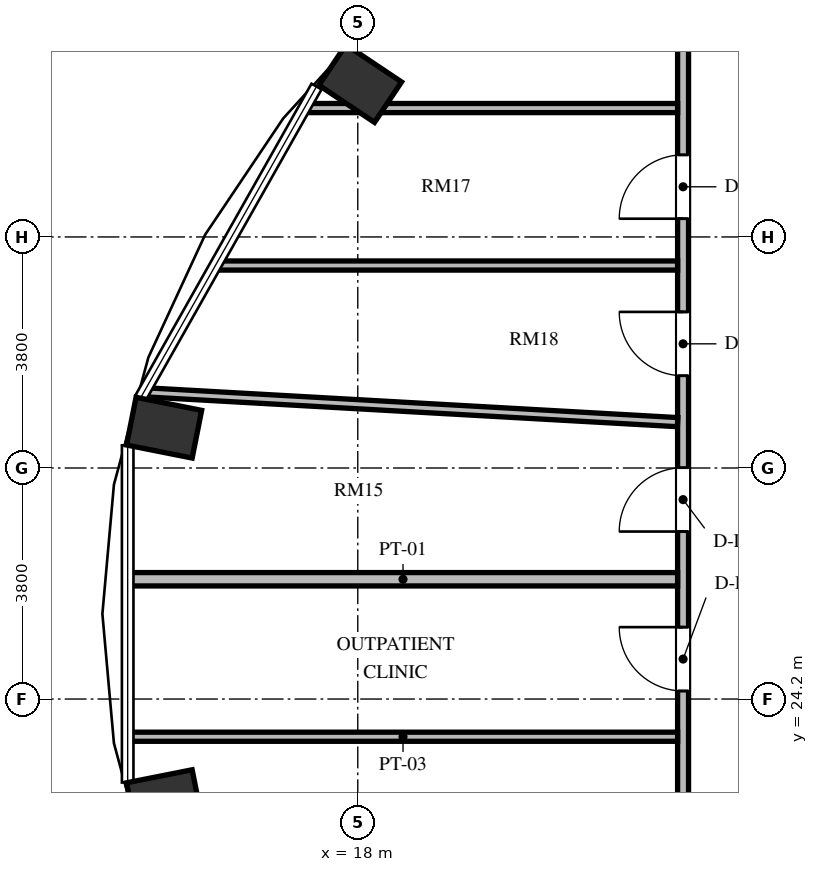
"""IFC4 building model, lengths in metres.
Left out: names, types, materials, properties, quantities, classifications, styles, units other than length and angle.
Written with IfcOpenShell. Run it as: python <this file> out.ifc"""

import sys

from ifc_helpers import new_model, si_unit, direction, frame, frame_2d, origin, origin_2d, place, context, subcontext, project, spatial, rectangle, extrude, element, fill, save


model = new_model("IFC4")
c1 = context("Model", 3, precision=1e-05, world=origin(), true_north=direction((0.0, 1.0)))
c2 = subcontext(c1, "Body", "Model", "MODEL_VIEW")
j1 = project(units=[si_unit("LENGTHUNIT", "METRE"), si_unit("PLANEANGLEUNIT", "RADIAN")], contexts=[c1])
p1 = place(None, origin())
s1 = spatial("IfcSite", under=j1, at=p1, CompositionType="ELEMENT")
p2 = place(p1, origin())
s2 = spatial("IfcBuilding", under=s1, at=p2, CompositionType="ELEMENT")
p3 = place(p2, frame((0.0, 0.0, 213.072)))
s3 = spatial("IfcBuildingStorey", under=s2, at=p3, CompositionType="ELEMENT", Elevation=213.072)
for number, where, z_axis, x_axis in (
    (1, (18.04, 34.323, 0.0), (0.0, 0.0, 1.0), (-0.831, 0.556, 0.0)),
    (2, (14.815, 28.663, 0.0), (0.0, 0.0, 1.0), (-0.981, 0.195, 0.0)),
    (3, (14.815, 22.537, 0.0), (0.0, 0.0, 1.0), (-0.981, -0.195, 0.0)),
):
    element("IfcColumn", number, at=place(p3, frame(where, z_axis=z_axis, x_axis=x_axis)), inside=s3, PredefinedType="COLUMN", context=c2, shape_type="SweptSolid", body=[
        extrude(rectangle(XDim=1.1, YDim=0.8, at=origin_2d()), origin(), (0.0, 0.0, 1.0), 3.648),
    ])
p4 = place(p3, frame((23.35, 19.98, 0.0), z_axis=(0.0, 0.0, 1.0), x_axis=(0.0, 1.0, 0.0)))
e4 = element("IfcWall", 4, at=p4, inside=s3, PredefinedType="PARTITIONING", context=c2, shape_type="SweptSolid", body=[
    extrude(rectangle(XDim=16.042, YDim=0.18, at=frame_2d((8.021, 0.0))), origin(), (0.0, 0.0, 1.0), 3.448),
])
p5 = place(p4, frame((6.975, 0.0, 0.0)))
e5 = element("IfcOpeningElement", 5, at=p5, cuts=e4, PredefinedType="OPENING", context=c2, shape_type="SweptSolid", body=[
    extrude(rectangle(XDim=1.05, YDim=2.15, at=frame_2d((0.525, 1.075))), frame((0.0, 0.1, 0.0), z_axis=(0.0, -1.0, 0.0), x_axis=(1.0, 0.0, 0.0)), (0.0, 0.0, 1.0), 0.2),
])
p6 = place(p4, frame((4.353, 0.0, 0.0)))
e6 = element("IfcOpeningElement", 6, at=p6, cuts=e4, PredefinedType="OPENING", context=c2, shape_type="SweptSolid", body=[
    extrude(rectangle(XDim=1.05, YDim=2.15, at=frame_2d((0.525, 1.075))), frame((0.0, 0.1, 0.0), z_axis=(0.0, -1.0, 0.0), x_axis=(1.0, 0.0, 0.0)), (0.0, 0.0, 1.0), 0.2),
])
p7 = place(p4, frame((12.12, 0.0, 0.0)))
e7 = element("IfcOpeningElement", 7, at=p7, cuts=e4, PredefinedType="OPENING", context=c2, shape_type="SweptSolid", body=[
    extrude(rectangle(XDim=1.05, YDim=2.15, at=frame_2d((0.525, 1.075))), frame((0.0, 0.1, 0.0), z_axis=(0.0, -1.0, 0.0), x_axis=(1.0, 0.0, 0.0)), (0.0, 0.0, 1.0), 0.2),
])
p8 = place(p4, frame((9.537, 0.0, 0.0)))
e8 = element("IfcOpeningElement", 8, at=p8, cuts=e4, PredefinedType="OPENING", context=c2, shape_type="SweptSolid", body=[
    extrude(rectangle(XDim=1.05, YDim=2.15, at=frame_2d((0.525, 1.075))), frame((0.0, 0.1, 0.0), z_axis=(0.0, -1.0, 0.0), x_axis=(1.0, 0.0, 0.0)), (0.0, 0.0, 1.0), 0.2),
])
p9 = place(p3, frame((14.228, 23.58, 0.0), z_axis=(0.0, 0.0, 1.0), x_axis=(1.0, 0.0, 0.0)))
e9 = element("IfcWall", 9, at=p9, inside=s3, PredefinedType="PARTITIONING", context=c2, shape_type="SweptSolid", body=[
    extrude(rectangle(XDim=9.032, YDim=0.15, at=frame_2d((4.516, 0.0))), origin(), (0.0, 0.0, 1.0), 3.448),
])
p10 = place(p3, frame((14.228, 26.17, 0.0), z_axis=(0.0, 0.0, 1.0), x_axis=(1.0, 0.0, 0.0)))
e10 = element("IfcWall", 10, at=p10, inside=s3, PredefinedType="PARTITIONING", context=c2, shape_type="SweptSolid", body=[
    extrude(rectangle(XDim=9.032, YDim=0.22, at=frame_2d((4.516, 0.0))), origin(), (0.0, 0.0, 1.0), 3.448),
])
p11 = place(p3, frame((14.477, 29.247, 0.0), z_axis=(0.0, 0.0, 1.0), x_axis=(0.998432044673, -0.05597724689, 0.0)))
e11 = element("IfcWall", 11, at=p11, inside=s3, PredefinedType="PARTITIONING", context=c2, shape_type="SweptSolid", body=[
    extrude(rectangle(XDim=8.797, YDim=0.15, at=frame_2d((4.398, 0.0))), origin(), (0.0, 0.0, 1.0), 3.448),
])
p12 = place(p3, frame((15.669, 31.33, 0.0), z_axis=(0.0, 0.0, 1.0), x_axis=(1.0, 0.0, 0.0)))
e12 = element("IfcWall", 12, at=p12, inside=s3, PredefinedType="PARTITIONING", context=c2, shape_type="SweptSolid", body=[
    extrude(rectangle(XDim=7.591, YDim=0.15, at=frame_2d((3.796, 0.0))), origin(), (0.0, 0.0, 1.0), 3.448),
])
p13 = place(p3, frame((17.132, 33.92, 0.0), z_axis=(0.0, 0.0, 1.0), x_axis=(1.0, 0.0, 0.0)))
e13 = element("IfcWall", 13, at=p13, inside=s3, PredefinedType="PARTITIONING", context=c2, shape_type="SweptSolid", body=[
    extrude(rectangle(XDim=6.128, YDim=0.15, at=frame_2d((3.064, 0.0))), origin(), (0.0, 0.0, 1.0), 3.448),
])
p14 = place(p5, origin())
e14 = element("IfcDoor", 14, at=p14, inside=s3, OperationType="SINGLE_SWING_LEFT", PredefinedType="DOOR", context=c2, shape_type="SweptSolid", body=[
    extrude(rectangle(XDim=1.05, YDim=2.15, at=frame_2d((0.525, 1.075))), frame((0.0, 0.025, 0.0), z_axis=(0.0, -1.0, 0.0), x_axis=(1.0, 0.0, 0.0)), (0.0, 0.0, 1.0), 0.05),
])
fill(e5, e14)
p15 = place(p6, origin())
e15 = element("IfcDoor", 15, at=p15, inside=s3, OperationType="SINGLE_SWING_RIGHT", PredefinedType="DOOR", context=c2, shape_type="SweptSolid", body=[
    extrude(rectangle(XDim=1.05, YDim=2.15, at=frame_2d((0.525, 1.075))), frame((0.0, 0.025, 0.0), z_axis=(0.0, -1.0, 0.0), x_axis=(1.0, 0.0, 0.0)), (0.0, 0.0, 1.0), 0.05),
])
fill(e6, e15)
p16 = place(p7, origin())
e16 = element("IfcDoor", 16, at=p16, inside=s3, OperationType="SINGLE_SWING_LEFT", PredefinedType="DOOR", context=c2, shape_type="SweptSolid", body=[
    extrude(rectangle(XDim=1.05, YDim=2.15, at=frame_2d((0.525, 1.075))), frame((0.0, 0.025, 0.0), z_axis=(0.0, -1.0, 0.0), x_axis=(1.0, 0.0, 0.0)), (0.0, 0.0, 1.0), 0.05),
])
fill(e7, e16)
p17 = place(p8, origin())
e17 = element("IfcDoor", 17, at=p17, inside=s3, OperationType="SINGLE_SWING_RIGHT", PredefinedType="DOOR", context=c2, shape_type="SweptSolid", body=[
    extrude(rectangle(XDim=1.05, YDim=2.15, at=frame_2d((0.525, 1.075))), frame((0.0, 0.025, 0.0), z_axis=(0.0, -1.0, 0.0), x_axis=(1.0, 0.0, 0.0)), (0.0, 0.0, 1.0), 0.05),
])
fill(e8, e17)
save(model, sys.argv[1])
